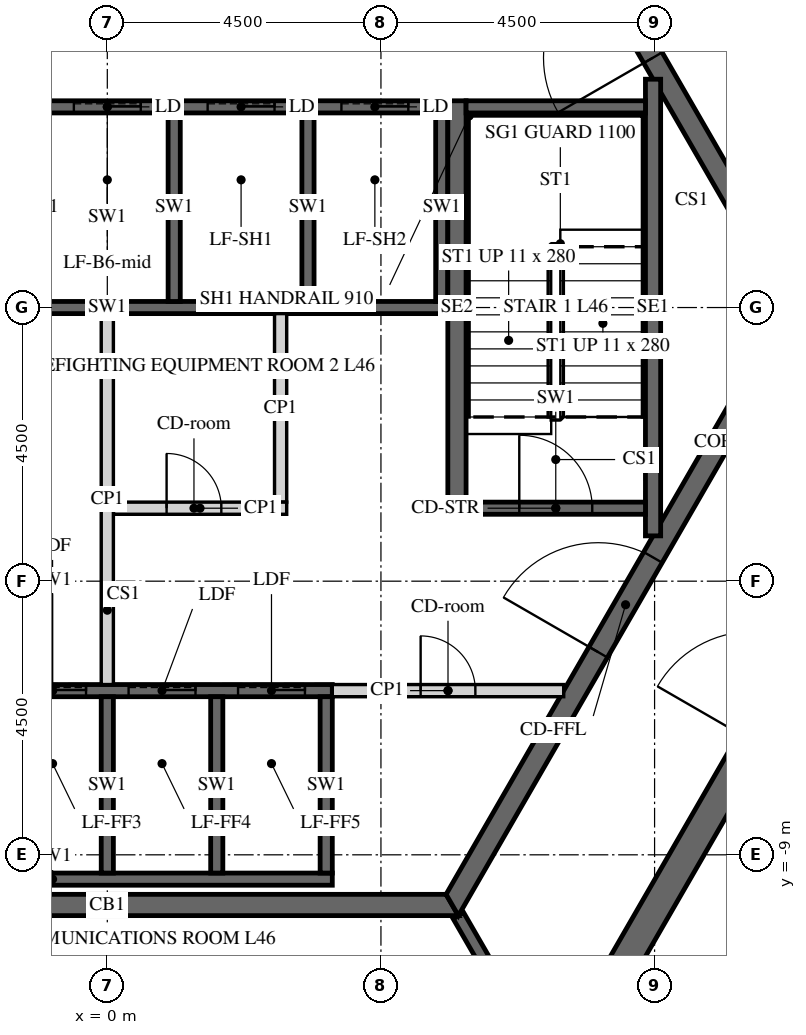
"""IFC4 building model, lengths in metres.
Left out: names, types, materials, properties, quantities, classifications, styles, units other than length and angle.
Written with IfcOpenShell. Run it as: python <this file> out.ifc"""

import sys

from ifc_helpers import new_model, si_unit, direction, frame, frame_2d, origin, place, context, subcontext, project, spatial, polyline, rectangle, outline, extrude, element, fill, save


model = new_model("IFC4")
c1 = context("Model", 3, precision=1e-05, world=origin(), true_north=direction((0.0, 1.0)))
c2 = subcontext(c1, "Body", "Model", "MODEL_VIEW")
j1 = project(units=[si_unit("LENGTHUNIT", "METRE"), si_unit("PLANEANGLEUNIT", "RADIAN")], contexts=[c1])
p1 = place(None, origin())
s1 = spatial("IfcSite", under=j1, at=p1, CompositionType="ELEMENT")
p2 = place(p1, origin())
s2 = spatial("IfcBuilding", under=s1, at=p2, CompositionType="ELEMENT")
p3 = place(p2, frame((0.0, 0.0, 195.6)))
s3 = spatial("IfcBuildingStorey", under=s2, at=p3, CompositionType="ELEMENT", Elevation=195.6)
p4 = place(p3, frame((7.361, -12.75, -0.15), z_axis=(0.0, 0.0, 1.0), x_axis=(0.50000571537, 0.866022103989, 0.0)))
e1 = element("IfcWall", 1, at=p4, inside=s3, PredefinedType="SHEAR", context=c2, shape_type="SweptSolid", body=[
    extrude(outline(polyline([(-0.144, -0.25), (14.867, -0.25), (14.578, 0.25), (0.144, 0.25), (-0.144, -0.25)])), origin(), (0.0, 0.0, 1.0), 3.9),
])
p5 = place(p4, frame((6.49, 0.0, 0.15)))
e2 = element("IfcOpeningElement", 2, at=p5, cuts=e1, PredefinedType="OPENING", context=c2, shape_type="SweptSolid", body=[
    extrude(rectangle(XDim=1.8, YDim=2.4, at=frame_2d((0.9, 1.2))), frame((0.0, 0.26, 0.0), z_axis=(0.0, -1.0, 0.0), x_axis=(1.0, 0.0, 0.0)), (0.0, 0.0, 1.0), 0.52),
])
p6 = place(p3, frame((14.722, 0.0, -0.15), z_axis=(0.0, 0.0, 1.0), x_axis=(-0.50000571537, 0.866022103989, 0.0)))
e3 = element("IfcWall", 3, at=p6, inside=s3, PredefinedType="SHEAR", context=c2, shape_type="SweptSolid", body=[
    extrude(outline(polyline([(-0.144, -0.25), (14.867, -0.25), (14.578, 0.25), (0.144, 0.25), (-0.144, -0.25)])), origin(), (0.0, 0.0, 1.0), 3.9),
])
p7 = place(p6, frame((6.432, 0.0, 0.15)))
e4 = element("IfcOpeningElement", 4, at=p7, cuts=e3, PredefinedType="OPENING", context=c2, shape_type="SweptSolid", body=[
    extrude(rectangle(XDim=1.8, YDim=2.4, at=frame_2d((0.9, 1.2))), frame((0.0, 0.26, 0.0), z_axis=(0.0, -1.0, 0.0), x_axis=(1.0, 0.0, 0.0)), (0.0, 0.0, 1.0), 0.52),
])
p8 = place(p3, frame((-5.673, -9.825, -0.15), z_axis=(0.0, 0.0, 1.0), x_axis=(1.0, 0.0, 0.0)))
e5 = element("IfcWall", 5, at=p8, inside=s3, PredefinedType="SHEAR", context=c2, shape_type="SweptSolid", body=[
    extrude(outline(polyline([(-0.101, -0.175), (11.446, -0.175), (11.244, 0.175), (0.101, 0.175), (-0.101, -0.175)])), origin(), (0.0, 0.0, 1.0), 3.9),
])
p9 = place(p3, frame((5.673, -9.825, -0.15), z_axis=(0.0, 0.0, 1.0), x_axis=(0.499995046907, 0.866028263435, 0.0)))
e6 = element("IfcWall", 6, at=p9, inside=s3, PredefinedType="SHEAR", context=c2, shape_type="SweptSolid", body=[
    extrude(outline(polyline([(-0.101, -0.175), (11.446, -0.175), (11.244, 0.175), (0.101, 0.175), (-0.101, -0.175)])), origin(), (0.0, 0.0, 1.0), 3.9),
])
p10 = place(p9, frame((4.801, 0.0, 0.15)))
e7 = element("IfcOpeningElement", 7, at=p10, cuts=e6, PredefinedType="OPENING", context=c2, shape_type="SweptSolid", body=[
    extrude(rectangle(XDim=1.8, YDim=2.4, at=frame_2d((0.9, 1.2))), frame((0.0, 0.185, 0.0), z_axis=(0.0, -1.0, 0.0), x_axis=(1.0, 0.0, 0.0)), (0.0, 0.0, 1.0), 0.37),
])
p11 = place(p3, frame((11.345, 0.0, -0.15), z_axis=(0.0, 0.0, 1.0), x_axis=(-0.499995046907, 0.866028263435, 0.0)))
e8 = element("IfcWall", 8, at=p11, inside=s3, PredefinedType="SHEAR", context=c2, shape_type="SweptSolid", body=[
    extrude(outline(polyline([(-0.101, -0.175), (11.446, -0.175), (11.244, 0.175), (0.101, 0.175), (-0.101, -0.175)])), origin(), (0.0, 0.0, 1.0), 3.9),
])
p12 = place(p11, frame((4.744, 0.0, 0.15)))
e9 = element("IfcOpeningElement", 9, at=p12, cuts=e8, PredefinedType="OPENING", context=c2, shape_type="SweptSolid", body=[
    extrude(rectangle(XDim=1.8, YDim=2.4, at=frame_2d((0.9, 1.2))), frame((0.0, 0.185, 0.0), z_axis=(0.0, -1.0, 0.0), x_axis=(1.0, 0.0, 0.0)), (0.0, 0.0, 1.0), 0.37),
])
p13 = place(p3, frame((-5.6, 3.3, -0.25), z_axis=(0.0, 0.0, 1.0), x_axis=(1.0, 0.0, 0.0)))
e10 = element("IfcWall", 10, at=p13, inside=s3, PredefinedType="SHEAR", context=c2, shape_type="SweptSolid", body=[
    extrude(rectangle(XDim=11.2, YDim=0.2, at=frame_2d((5.6, 0.0))), origin(), (0.0, 0.0, 1.0), 3.9),
])
p14 = place(p13, frame((0.65, 0.0, 0.25)))
e11 = element("IfcOpeningElement", 11, at=p14, cuts=e10, PredefinedType="OPENING", context=c2, shape_type="SweptSolid", body=[
    extrude(rectangle(XDim=1.1, YDim=2.1, at=frame_2d((0.55, 1.05))), frame((0.0, 0.11, 0.0), z_axis=(0.0, -1.0, 0.0), x_axis=(1.0, 0.0, 0.0)), (0.0, 0.0, 1.0), 0.22),
])
p15 = place(p13, frame((2.85, 0.0, 0.25)))
e12 = element("IfcOpeningElement", 12, at=p15, cuts=e10, PredefinedType="OPENING", context=c2, shape_type="SweptSolid", body=[
    extrude(rectangle(XDim=1.1, YDim=2.1, at=frame_2d((0.55, 1.05))), frame((0.0, 0.11, 0.0), z_axis=(0.0, -1.0, 0.0), x_axis=(1.0, 0.0, 0.0)), (0.0, 0.0, 1.0), 0.22),
])
p16 = place(p13, frame((5.05, 0.0, 0.25)))
e13 = element("IfcOpeningElement", 13, at=p16, cuts=e10, PredefinedType="OPENING", context=c2, shape_type="SweptSolid", body=[
    extrude(rectangle(XDim=1.1, YDim=2.1, at=frame_2d((0.55, 1.05))), frame((0.0, 0.11, 0.0), z_axis=(0.0, -1.0, 0.0), x_axis=(1.0, 0.0, 0.0)), (0.0, 0.0, 1.0), 0.22),
])
p17 = place(p13, frame((7.25, 0.0, 0.25)))
e14 = element("IfcOpeningElement", 14, at=p17, cuts=e10, PredefinedType="OPENING", context=c2, shape_type="SweptSolid", body=[
    extrude(rectangle(XDim=1.1, YDim=2.1, at=frame_2d((0.55, 1.05))), frame((0.0, 0.11, 0.0), z_axis=(0.0, -1.0, 0.0), x_axis=(1.0, 0.0, 0.0)), (0.0, 0.0, 1.0), 0.22),
])
p18 = place(p13, frame((9.45, 0.0, 0.25)))
e15 = element("IfcOpeningElement", 15, at=p18, cuts=e10, PredefinedType="OPENING", context=c2, shape_type="SweptSolid", body=[
    extrude(rectangle(XDim=1.1, YDim=2.1, at=frame_2d((0.55, 1.05))), frame((0.0, 0.11, 0.0), z_axis=(0.0, -1.0, 0.0), x_axis=(1.0, 0.0, 0.0)), (0.0, 0.0, 1.0), 0.22),
])
p19 = place(p3, frame((-5.6, 0.0, -0.25), z_axis=(0.0, 0.0, 1.0), x_axis=(1.0, 0.0, 0.0)))
e16 = element("IfcWall", 16, at=p19, inside=s3, PredefinedType="SHEAR", context=c2, shape_type="SweptSolid", body=[
    extrude(rectangle(XDim=11.2, YDim=0.2, at=frame_2d((5.6, 0.0))), origin(), (0.0, 0.0, 1.0), 3.9),
])
for number, where, z_axis, x_axis in (
    (17, (1.1, 0.1, -0.25), (0.0, 0.0, 1.0), (0.0, 1.0, 0.0)),
    (18, (3.3, 0.1, -0.25), (0.0, 0.0, 1.0), (0.0, 1.0, 0.0)),
    (19, (5.5, 0.1, -0.25), (0.0, 0.0, 1.0), (0.0, 1.0, 0.0)),
):
    element("IfcWall", number, at=place(p3, frame(where, z_axis=z_axis, x_axis=x_axis)), inside=s3, PredefinedType="SHEAR", context=c2, shape_type="SweptSolid", body=[
        extrude(rectangle(XDim=3.1, YDim=0.2, at=frame_2d((1.55, 0.0))), origin(), (0.0, 0.0, 1.0), 3.9),
    ])
p20 = place(p3, frame((-5.5, -6.3, -0.25), z_axis=(0.0, 0.0, 1.0), x_axis=(1.0, 0.0, 0.0)))
e20 = element("IfcWall", 20, at=p20, inside=s3, PredefinedType="SHEAR", context=c2, shape_type="SweptSolid", body=[
    extrude(rectangle(XDim=9.2, YDim=0.2, at=frame_2d((4.6, 0.0))), origin(), (0.0, 0.0, 1.0), 3.9),
])
p21 = place(p20, frame((0.45, 0.0, 0.25)))
e21 = element("IfcOpeningElement", 21, at=p21, cuts=e20, PredefinedType="OPENING", context=c2, shape_type="SweptSolid", body=[
    extrude(rectangle(XDim=1.1, YDim=2.1, at=frame_2d((0.55, 1.05))), frame((0.0, 0.11, 0.0), z_axis=(0.0, -1.0, 0.0), x_axis=(1.0, 0.0, 0.0)), (0.0, 0.0, 1.0), 0.22),
])
p22 = place(p20, frame((2.25, 0.0, 0.25)))
e22 = element("IfcOpeningElement", 22, at=p22, cuts=e20, PredefinedType="OPENING", context=c2, shape_type="SweptSolid", body=[
    extrude(rectangle(XDim=1.1, YDim=2.1, at=frame_2d((0.55, 1.05))), frame((0.0, 0.11, 0.0), z_axis=(0.0, -1.0, 0.0), x_axis=(1.0, 0.0, 0.0)), (0.0, 0.0, 1.0), 0.22),
])
p23 = place(p20, frame((4.05, 0.0, 0.25)))
e23 = element("IfcOpeningElement", 23, at=p23, cuts=e20, PredefinedType="OPENING", context=c2, shape_type="SweptSolid", body=[
    extrude(rectangle(XDim=1.1, YDim=2.1, at=frame_2d((0.55, 1.05))), frame((0.0, 0.11, 0.0), z_axis=(0.0, -1.0, 0.0), x_axis=(1.0, 0.0, 0.0)), (0.0, 0.0, 1.0), 0.22),
])
p24 = place(p20, frame((5.85, 0.0, 0.25)))
e24 = element("IfcOpeningElement", 24, at=p24, cuts=e20, PredefinedType="OPENING", context=c2, shape_type="SweptSolid", body=[
    extrude(rectangle(XDim=1.1, YDim=2.1, at=frame_2d((0.55, 1.05))), frame((0.0, 0.11, 0.0), z_axis=(0.0, -1.0, 0.0), x_axis=(1.0, 0.0, 0.0)), (0.0, 0.0, 1.0), 0.22),
])
p25 = place(p20, frame((7.65, 0.0, 0.25)))
e25 = element("IfcOpeningElement", 25, at=p25, cuts=e20, PredefinedType="OPENING", context=c2, shape_type="SweptSolid", body=[
    extrude(rectangle(XDim=1.1, YDim=2.1, at=frame_2d((0.55, 1.05))), frame((0.0, 0.11, 0.0), z_axis=(0.0, -1.0, 0.0), x_axis=(1.0, 0.0, 0.0)), (0.0, 0.0, 1.0), 0.22),
])
p26 = place(p3, frame((-5.5, -9.4, -0.25), z_axis=(0.0, 0.0, 1.0), x_axis=(1.0, 0.0, 0.0)))
e26 = element("IfcWall", 26, at=p26, inside=s3, PredefinedType="SHEAR", context=c2, shape_type="SweptSolid", body=[
    extrude(rectangle(XDim=9.2, YDim=0.2, at=frame_2d((4.6, 0.0))), origin(), (0.0, 0.0, 1.0), 3.9),
])
for number, where, z_axis, x_axis in (
    (27, (0.0, -9.3, -0.25), (0.0, 0.0, 1.0), (0.0, 1.0, 0.0)),
    (28, (1.8, -9.3, -0.25), (0.0, 0.0, 1.0), (0.0, 1.0, 0.0)),
    (29, (3.6, -9.3, -0.25), (0.0, 0.0, 1.0), (0.0, 1.0, 0.0)),
):
    element("IfcWall", number, at=place(p3, frame(where, z_axis=z_axis, x_axis=x_axis)), inside=s3, PredefinedType="SHEAR", context=c2, shape_type="SweptSolid", body=[
        extrude(rectangle(XDim=2.9, YDim=0.2, at=frame_2d((1.45, 0.0))), origin(), (0.0, 0.0, 1.0), 3.9),
    ])
p27 = place(p3, frame((0.1, -3.3, 0.0), z_axis=(0.0, 0.0, 1.0), x_axis=(1.0, 0.0, 0.0)))
e30 = element("IfcWall", 30, at=p27, inside=s3, PredefinedType="PARTITIONING", context=c2, shape_type="SweptSolid", body=[
    extrude(rectangle(XDim=2.85, YDim=0.2, at=frame_2d((1.425, 0.0))), origin(), (0.0, 0.0, 1.0), 3.65),
])
p28 = place(p27, frame((0.875, 0.0, 0.0)))
e31 = element("IfcOpeningElement", 31, at=p28, cuts=e30, PredefinedType="OPENING", context=c2, shape_type="SweptSolid", body=[
    extrude(rectangle(XDim=0.9, YDim=2.1, at=frame_2d((0.45, 1.05))), frame((0.0, 0.11, 0.0), z_axis=(0.0, -1.0, 0.0), x_axis=(1.0, 0.0, 0.0)), (0.0, 0.0, 1.0), 0.22),
])
p29 = place(p3, frame((2.85, -3.2, 0.0), z_axis=(0.0, 0.0, 1.0), x_axis=(0.0, 1.0, 0.0)))
e32 = element("IfcWall", 32, at=p29, inside=s3, PredefinedType="PARTITIONING", context=c2, shape_type="SweptSolid", body=[
    extrude(rectangle(XDim=3.1, YDim=0.2, at=frame_2d((1.55, 0.0))), origin(), (0.0, 0.0, 1.0), 3.65),
])
p30 = place(p3, frame((0.0, -6.2, 0.0), z_axis=(0.0, 0.0, 1.0), x_axis=(0.0, 1.0, 0.0)))
e33 = element("IfcWall", 33, at=p30, inside=s3, PredefinedType="PARTITIONING", context=c2, shape_type="SweptSolid", body=[
    extrude(rectangle(XDim=6.1, YDim=0.2, at=frame_2d((3.05, 0.0))), origin(), (0.0, 0.0, 1.0), 3.65),
])
p31 = place(p3, frame((3.7, -6.3, 0.0), z_axis=(0.0, 0.0, 1.0), x_axis=(1.0, 0.0, 0.0)))
e34 = element("IfcWall", 34, at=p31, inside=s3, PredefinedType="PARTITIONING", context=c2, shape_type="SweptSolid", body=[
    extrude(rectangle(XDim=3.806, YDim=0.2, at=frame_2d((1.903, 0.0))), origin(), (0.0, 0.0, 1.0), 3.65),
])
p32 = place(p31, frame((1.453, 0.0, 0.0)))
e35 = element("IfcOpeningElement", 35, at=p32, cuts=e34, PredefinedType="OPENING", context=c2, shape_type="SweptSolid", body=[
    extrude(rectangle(XDim=0.9, YDim=2.1, at=frame_2d((0.45, 1.05))), frame((0.0, 0.11, 0.0), z_axis=(0.0, -1.0, 0.0), x_axis=(1.0, 0.0, 0.0)), (0.0, 0.0, 1.0), 0.22),
])
p33 = place(p3, frame((5.773, -10.0, -0.15), z_axis=(0.0, 0.0, 1.0), x_axis=(0.499995765644, -0.866027848477, 0.0)))
e36 = element("IfcWall", 36, at=p33, inside=s3, PredefinedType="SHEAR", context=c2, shape_type="SweptSolid", body=[
    extrude(rectangle(XDim=2.887, YDim=0.2, at=frame_2d((1.443, 0.0))), origin(), (0.0, 0.0, 1.0), 3.9),
])
p34 = place(p3, frame((5.75, -3.4, -0.25), z_axis=(0.0, 0.0, 1.0), x_axis=(0.0, 1.0, 0.0)))
e37 = element("IfcWall", 37, at=p34, inside=s3, PredefinedType="SHEAR", context=c2, shape_type="SweptSolid", body=[
    extrude(rectangle(XDim=6.8, YDim=0.3, at=frame_2d((3.4, 0.0))), origin(), (0.0, 0.0, 1.0), 3.9),
])
p35 = place(p3, frame((8.975, -3.755, -0.25), z_axis=(0.0, 0.0, 1.0), x_axis=(0.0, 1.0, 0.0)))
e38 = element("IfcWall", 38, at=p35, inside=s3, PredefinedType="SHEAR", context=c2, shape_type="SweptSolid", body=[
    extrude(rectangle(XDim=7.51, YDim=0.25, at=frame_2d((3.755, 0.0))), origin(), (0.0, 0.0, 1.0), 3.9),
])
p36 = place(p3, frame((5.9, 3.3, -0.25), z_axis=(0.0, 0.0, 1.0), x_axis=(1.0, 0.0, 0.0)))
e39 = element("IfcWall", 39, at=p36, inside=s3, PredefinedType="SHEAR", context=c2, shape_type="SweptSolid", body=[
    extrude(rectangle(XDim=2.95, YDim=0.2, at=frame_2d((1.475, 0.0))), origin(), (0.0, 0.0, 1.0), 3.9),
])
p37 = place(p3, frame((5.9, -3.3, -0.25), z_axis=(0.0, 0.0, 1.0), x_axis=(1.0, 0.0, 0.0)))
e40 = element("IfcWall", 40, at=p37, inside=s3, PredefinedType="SHEAR", context=c2, shape_type="SweptSolid", body=[
    extrude(rectangle(XDim=2.95, YDim=0.2, at=frame_2d((1.475, 0.0))), origin(), (0.0, 0.0, 1.0), 3.9),
])
p38 = place(p37, frame((0.875, 0.0, 0.25)))
e41 = element("IfcOpeningElement", 41, at=p38, cuts=e40, PredefinedType="OPENING", context=c2, shape_type="SweptSolid", body=[
    extrude(rectangle(XDim=1.2, YDim=2.4, at=frame_2d((0.6, 1.2))), frame((0.0, 0.11, 0.0), z_axis=(0.0, -1.0, 0.0), x_axis=(1.0, 0.0, 0.0)), (0.0, 0.0, 1.0), 0.22),
])
p39 = place(p3, frame((9.887, -12.875, 0.0), z_axis=(0.0, 0.0, 1.0), x_axis=(0.499998228944, 0.866026426302, 0.0)))
e42 = element("IfcWall", 42, at=p39, inside=s3, PredefinedType="PARTITIONING", context=c2, shape_type="SweptSolid", body=[
    extrude(rectangle(XDim=14.867, YDim=0.15, at=frame_2d((7.433, 0.0))), origin(), (0.0, 0.0, 1.0), 2.988),
])
p40 = place(p39, frame((3.519, 0.0, 0.0)))
e43 = element("IfcOpeningElement", 43, at=p40, cuts=e42, PredefinedType="OPENING", context=c2, shape_type="SweptSolid", body=[
    extrude(rectangle(XDim=1.0, YDim=2.1, at=frame_2d((0.5, 1.05))), frame((0.0, 0.085, 0.0), z_axis=(0.0, -1.0, 0.0), x_axis=(1.0, 0.0, 0.0)), (0.0, 0.0, 1.0), 0.17),
])
p41 = place(p39, frame((6.824, 0.0, 0.0)))
e44 = element("IfcOpeningElement", 44, at=p41, cuts=e42, PredefinedType="OPENING", context=c2, shape_type="SweptSolid", body=[
    extrude(rectangle(XDim=1.0, YDim=2.1, at=frame_2d((0.5, 1.05))), frame((0.0, 0.085, 0.0), z_axis=(0.0, -1.0, 0.0), x_axis=(1.0, 0.0, 0.0)), (0.0, 0.0, 1.0), 0.17),
])
p42 = place(p39, frame((10.424, 0.0, 0.0)))
e45 = element("IfcOpeningElement", 45, at=p42, cuts=e42, PredefinedType="OPENING", context=c2, shape_type="SweptSolid", body=[
    extrude(rectangle(XDim=1.0, YDim=2.1, at=frame_2d((0.5, 1.05))), frame((0.0, 0.085, 0.0), z_axis=(0.0, -1.0, 0.0), x_axis=(1.0, 0.0, 0.0)), (0.0, 0.0, 1.0), 0.17),
])
p43 = place(p39, frame((13.667, 0.0, 0.0)))
e46 = element("IfcOpeningElement", 46, at=p43, cuts=e42, PredefinedType="OPENING", context=c2, shape_type="SweptSolid", body=[
    extrude(rectangle(XDim=1.0, YDim=2.1, at=frame_2d((0.5, 1.05))), frame((0.0, 0.085, 0.0), z_axis=(0.0, -1.0, 0.0), x_axis=(1.0, 0.0, 0.0)), (0.0, 0.0, 1.0), 0.17),
])
p44 = place(p12, origin())
e47 = element("IfcDoor", 47, at=p44, inside=s3, OperationType="DOUBLE_DOOR_SINGLE_SWING", PredefinedType="DOOR", context=c2, shape_type="SweptSolid", body=[
    extrude(rectangle(XDim=1.8, YDim=2.4, at=frame_2d((0.9, 1.2))), frame((0.0, 0.025, 0.0), z_axis=(0.0, -1.0, 0.0), x_axis=(1.0, 0.0, 0.0)), (0.0, 0.0, 1.0), 0.05),
])
fill(e9, e47)
p45 = place(p10, origin())
e48 = element("IfcDoor", 48, at=p45, inside=s3, OperationType="DOUBLE_DOOR_SINGLE_SWING", PredefinedType="DOOR", context=c2, shape_type="SweptSolid", body=[
    extrude(rectangle(XDim=1.8, YDim=2.4, at=frame_2d((0.9, 1.2))), frame((0.0, 0.025, 0.0), z_axis=(0.0, -1.0, 0.0), x_axis=(1.0, 0.0, 0.0)), (0.0, 0.0, 1.0), 0.05),
])
fill(e7, e48)
p46 = place(p28, origin())
e49 = element("IfcDoor", 49, at=p46, inside=s3, OperationType="SINGLE_SWING_LEFT", PredefinedType="DOOR", context=c2, shape_type="SweptSolid", body=[
    extrude(rectangle(XDim=0.9, YDim=2.1, at=frame_2d((0.45, 1.05))), frame((0.0, 0.025, 0.0), z_axis=(0.0, -1.0, 0.0), x_axis=(1.0, 0.0, 0.0)), (0.0, 0.0, 1.0), 0.05),
])
fill(e31, e49)
p47 = place(p32, origin())
e50 = element("IfcDoor", 50, at=p47, inside=s3, OperationType="SINGLE_SWING_LEFT", PredefinedType="DOOR", context=c2, shape_type="SweptSolid", body=[
    extrude(rectangle(XDim=0.9, YDim=2.1, at=frame_2d((0.45, 1.05))), frame((0.0, 0.025, 0.0), z_axis=(0.0, -1.0, 0.0), x_axis=(1.0, 0.0, 0.0)), (0.0, 0.0, 1.0), 0.05),
])
fill(e35, e50)
p48 = place(p38, origin())
e51 = element("IfcDoor", 51, at=p48, inside=s3, OperationType="SINGLE_SWING_LEFT", PredefinedType="DOOR", context=c2, shape_type="SweptSolid", body=[
    extrude(rectangle(XDim=1.2, YDim=2.4, at=frame_2d((0.6, 1.2))), frame((0.0, 0.025, 0.0), z_axis=(0.0, -1.0, 0.0), x_axis=(1.0, 0.0, 0.0)), (0.0, 0.0, 1.0), 0.05),
])
fill(e41, e51)
p49 = place(p16, origin())
e52 = element("IfcDoor", 52, at=p49, inside=s3, OperationType="SLIDING_TO_LEFT", PredefinedType="DOOR", context=c2, shape_type="SweptSolid", body=[
    extrude(rectangle(XDim=1.1, YDim=2.1, at=frame_2d((0.55, 1.05))), frame((0.0, 0.025, 0.0), z_axis=(0.0, -1.0, 0.0), x_axis=(1.0, 0.0, 0.0)), (0.0, 0.0, 1.0), 0.05),
])
fill(e13, e52)
p50 = place(p17, origin())
e53 = element("IfcDoor", 53, at=p50, inside=s3, OperationType="SLIDING_TO_LEFT", PredefinedType="DOOR", context=c2, shape_type="SweptSolid", body=[
    extrude(rectangle(XDim=1.1, YDim=2.1, at=frame_2d((0.55, 1.05))), frame((0.0, 0.025, 0.0), z_axis=(0.0, -1.0, 0.0), x_axis=(1.0, 0.0, 0.0)), (0.0, 0.0, 1.0), 0.05),
])
fill(e14, e53)
p51 = place(p18, origin())
e54 = element("IfcDoor", 54, at=p51, inside=s3, OperationType="SLIDING_TO_LEFT", PredefinedType="DOOR", context=c2, shape_type="SweptSolid", body=[
    extrude(rectangle(XDim=1.1, YDim=2.1, at=frame_2d((0.55, 1.05))), frame((0.0, 0.025, 0.0), z_axis=(0.0, -1.0, 0.0), x_axis=(1.0, 0.0, 0.0)), (0.0, 0.0, 1.0), 0.05),
])
fill(e15, e54)
p52 = place(p23, origin())
e55 = element("IfcDoor", 55, at=p52, inside=s3, OperationType="SLIDING_TO_LEFT", PredefinedType="DOOR", context=c2, shape_type="SweptSolid", body=[
    extrude(rectangle(XDim=1.1, YDim=2.1, at=frame_2d((0.55, 1.05))), frame((0.0, 0.025, 0.0), z_axis=(0.0, -1.0, 0.0), x_axis=(1.0, 0.0, 0.0)), (0.0, 0.0, 1.0), 0.05),
])
fill(e23, e55)
p53 = place(p24, origin())
e56 = element("IfcDoor", 56, at=p53, inside=s3, OperationType="SLIDING_TO_LEFT", PredefinedType="DOOR", context=c2, shape_type="SweptSolid", body=[
    extrude(rectangle(XDim=1.1, YDim=2.1, at=frame_2d((0.55, 1.05))), frame((0.0, 0.025, 0.0), z_axis=(0.0, -1.0, 0.0), x_axis=(1.0, 0.0, 0.0)), (0.0, 0.0, 1.0), 0.05),
])
fill(e24, e56)
p54 = place(p25, origin())
e57 = element("IfcDoor", 57, at=p54, inside=s3, OperationType="SLIDING_TO_LEFT", PredefinedType="DOOR", context=c2, shape_type="SweptSolid", body=[
    extrude(rectangle(XDim=1.1, YDim=2.1, at=frame_2d((0.55, 1.05))), frame((0.0, 0.025, 0.0), z_axis=(0.0, -1.0, 0.0), x_axis=(1.0, 0.0, 0.0)), (0.0, 0.0, 1.0), 0.05),
])
fill(e25, e57)
save(model, sys.argv[1])
